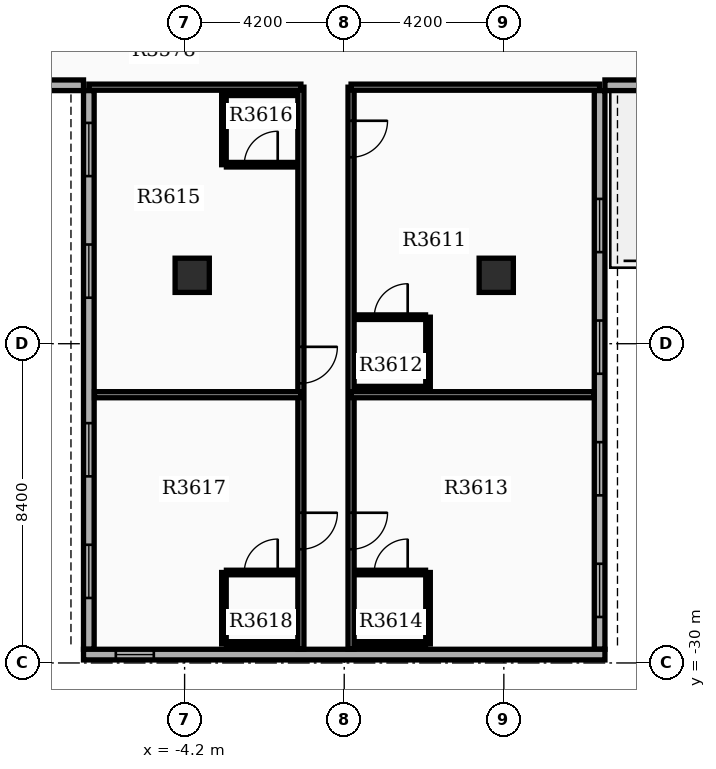
"""IFC4 building model, lengths in metres.
Left out: names, types, materials, properties, quantities, classifications, styles, units other than length and angle.
Written with IfcOpenShell. Run it as: python <this file> out.ifc"""

import sys

from ifc_helpers import new_model, si_unit, direction, frame, frame_2d, origin, origin_2d, place, context, subcontext, project, spatial, rectangle, extrude, element, fill, save


model = new_model("IFC4")
c1 = context("Model", 3, precision=1e-05, world=origin(), true_north=direction((0.0, 1.0)))
c2 = subcontext(c1, "Body", "Model", "MODEL_VIEW")
j1 = project(units=[si_unit("LENGTHUNIT", "METRE"), si_unit("PLANEANGLEUNIT", "RADIAN")], contexts=[c1])
p1 = place(None, origin())
s1 = spatial("IfcSite", under=j1, at=p1, CompositionType="ELEMENT")
p2 = place(p1, origin())
s2 = spatial("IfcBuilding", under=s1, at=p2, CompositionType="ELEMENT")
p3 = place(p2, frame((0.0, 0.0, 224.7)))
s3 = spatial("IfcBuildingStorey", under=s2, at=p3, CompositionType="ELEMENT", Elevation=224.7)
for number, where, z_axis, x_axis in (
    (1, (-4.0, -19.8, 0.0), (0.0, 0.0, 1.0), (1.0, 0.0, 0.0)),
    (2, (4.0, -19.8, 0.0), (0.0, 0.0, 1.0), (1.0, 0.0, 0.0)),
):
    element("IfcColumn", number, at=place(p3, frame(where, z_axis=z_axis, x_axis=x_axis)), inside=s3, PredefinedType="COLUMN", context=c2, shape_type="SweptSolid", body=[
        extrude(rectangle(XDim=0.9, YDim=0.9, at=origin_2d()), origin(), (0.0, 0.0, 1.0), 3.9),
    ])
p4 = place(p3, frame((-6.72, -14.94, 0.0), z_axis=(0.0, 0.0, 1.0), x_axis=(0.0, -1.0, 0.0)))
e3 = element("IfcWall", 3, at=p4, inside=s3, PredefinedType="STANDARD", context=c2, shape_type="SweptSolid", body=[
    extrude(rectangle(XDim=14.7, YDim=0.28, at=frame_2d((7.35, 0.0))), origin(), (0.0, 0.0, 1.0), 3.18),
])
p5 = place(p4, frame((0.85, 0.0, 0.8)))
e4 = element("IfcOpeningElement", 4, at=p5, cuts=e3, PredefinedType="OPENING", context=c2, shape_type="SweptSolid", body=[
    extrude(rectangle(XDim=1.4, YDim=1.6, at=frame_2d((0.7, 0.8))), frame((0.0, 0.15, 0.0), z_axis=(0.0, -1.0, 0.0), x_axis=(1.0, 0.0, 0.0)), (0.0, 0.0, 1.0), 0.3),
])
p6 = place(p4, frame((4.05, 0.0, 0.8)))
e5 = element("IfcOpeningElement", 5, at=p6, cuts=e3, PredefinedType="OPENING", context=c2, shape_type="SweptSolid", body=[
    extrude(rectangle(XDim=1.4, YDim=1.6, at=frame_2d((0.7, 0.8))), frame((0.0, 0.15, 0.0), z_axis=(0.0, -1.0, 0.0), x_axis=(1.0, 0.0, 0.0)), (0.0, 0.0, 1.0), 0.3),
])
p7 = place(p4, frame((8.75, 0.0, 0.8)))
e6 = element("IfcOpeningElement", 6, at=p7, cuts=e3, PredefinedType="OPENING", context=c2, shape_type="SweptSolid", body=[
    extrude(rectangle(XDim=1.4, YDim=1.6, at=frame_2d((0.7, 0.8))), frame((0.0, 0.15, 0.0), z_axis=(0.0, -1.0, 0.0), x_axis=(1.0, 0.0, 0.0)), (0.0, 0.0, 1.0), 0.3),
])
p8 = place(p4, frame((11.95, 0.0, 0.8)))
e7 = element("IfcOpeningElement", 7, at=p8, cuts=e3, PredefinedType="OPENING", context=c2, shape_type="SweptSolid", body=[
    extrude(rectangle(XDim=1.4, YDim=1.6, at=frame_2d((0.7, 0.8))), frame((0.0, 0.15, 0.0), z_axis=(0.0, -1.0, 0.0), x_axis=(1.0, 0.0, 0.0)), (0.0, 0.0, 1.0), 0.3),
])
p9 = place(p3, frame((6.72, -29.64, 0.0), z_axis=(0.0, 0.0, 1.0), x_axis=(0.0, 1.0, 0.0)))
e8 = element("IfcWall", 8, at=p9, inside=s3, PredefinedType="STANDARD", context=c2, shape_type="SweptSolid", body=[
    extrude(rectangle(XDim=14.7, YDim=0.28, at=frame_2d((7.35, 0.0))), origin(), (0.0, 0.0, 1.0), 3.18),
])
p10 = place(p9, frame((0.85, 0.0, 0.8)))
e9 = element("IfcOpeningElement", 9, at=p10, cuts=e8, PredefinedType="OPENING", context=c2, shape_type="SweptSolid", body=[
    extrude(rectangle(XDim=1.4, YDim=1.6, at=frame_2d((0.7, 0.8))), frame((0.0, 0.15, 0.0), z_axis=(0.0, -1.0, 0.0), x_axis=(1.0, 0.0, 0.0)), (0.0, 0.0, 1.0), 0.3),
])
p11 = place(p9, frame((4.05, 0.0, 0.8)))
e10 = element("IfcOpeningElement", 10, at=p11, cuts=e8, PredefinedType="OPENING", context=c2, shape_type="SweptSolid", body=[
    extrude(rectangle(XDim=1.4, YDim=1.6, at=frame_2d((0.7, 0.8))), frame((0.0, 0.15, 0.0), z_axis=(0.0, -1.0, 0.0), x_axis=(1.0, 0.0, 0.0)), (0.0, 0.0, 1.0), 0.3),
])
p12 = place(p9, frame((7.25, 0.0, 0.8)))
e11 = element("IfcOpeningElement", 11, at=p12, cuts=e8, PredefinedType="OPENING", context=c2, shape_type="SweptSolid", body=[
    extrude(rectangle(XDim=1.4, YDim=1.6, at=frame_2d((0.7, 0.8))), frame((0.0, 0.15, 0.0), z_axis=(0.0, -1.0, 0.0), x_axis=(1.0, 0.0, 0.0)), (0.0, 0.0, 1.0), 0.3),
])
p13 = place(p9, frame((10.45, 0.0, 0.8)))
e12 = element("IfcOpeningElement", 12, at=p13, cuts=e8, PredefinedType="OPENING", context=c2, shape_type="SweptSolid", body=[
    extrude(rectangle(XDim=1.4, YDim=1.6, at=frame_2d((0.7, 0.8))), frame((0.0, 0.15, 0.0), z_axis=(0.0, -1.0, 0.0), x_axis=(1.0, 0.0, 0.0)), (0.0, 0.0, 1.0), 0.3),
])
p14 = place(p3, frame((-6.86, -29.78, 0.0), z_axis=(0.0, 0.0, 1.0), x_axis=(1.0, 0.0, 0.0)))
e13 = element("IfcWall", 13, at=p14, inside=s3, PredefinedType="STANDARD", context=c2, shape_type="SweptSolid", body=[
    extrude(rectangle(XDim=13.72, YDim=0.28, at=frame_2d((6.86, 0.0))), origin(), (0.0, 0.0, 1.0), 3.18),
])
p15 = place(p14, frame((0.85, 0.0, 0.85)))
e14 = element("IfcOpeningElement", 14, at=p15, cuts=e13, PredefinedType="OPENING", context=c2, shape_type="SweptSolid", body=[
    extrude(rectangle(XDim=1.0, YDim=1.5, at=frame_2d((0.5, 0.75))), frame((0.0, 0.15, 0.0), z_axis=(0.0, -1.0, 0.0), x_axis=(1.0, 0.0, 0.0)), (0.0, 0.0, 1.0), 0.3),
])
for number, where, z_axis, x_axis in (
    (15, (-13.16, -14.8, 0.0), (0.0, 0.0, 1.0), (1.0, 0.0, 0.0)),
    (16, (13.16, -14.8, 0.0), (0.0, 0.0, 1.0), (-1.0, 0.0, 0.0)),
):
    element("IfcWall", number, at=place(p3, frame(where, z_axis=z_axis, x_axis=x_axis)), inside=s3, PredefinedType="STANDARD", context=c2, shape_type="SweptSolid", body=[
        extrude(rectangle(XDim=6.3, YDim=0.28, at=frame_2d((3.15, 0.0))), origin(), (0.0, 0.0, 1.0), 3.18),
    ])
p16 = place(p3, frame((0.18, -14.85, 0.0), z_axis=(0.0, 0.0, 1.0), x_axis=(0.0, -1.0, 0.0)))
e17 = element("IfcWall", 17, at=p16, inside=s3, PredefinedType="PARTITIONING", context=c2, shape_type="SweptSolid", body=[
    extrude(rectangle(XDim=14.782, YDim=0.16, at=frame_2d((7.391, 0.0))), origin(), (0.0, 0.0, 1.0), 3.17),
])
p17 = place(p16, frame((0.884, 0.0, 0.0)))
e18 = element("IfcOpeningElement", 18, at=p17, cuts=e17, PredefinedType="OPENING", context=c2, shape_type="SweptSolid", body=[
    extrude(rectangle(XDim=0.96, YDim=2.15, at=frame_2d((0.48, 1.075))), frame((0.0, 0.09, 0.0), z_axis=(0.0, -1.0, 0.0), x_axis=(1.0, 0.0, 0.0)), (0.0, 0.0, 1.0), 0.18),
])
p18 = place(p16, frame((11.198, 0.0, 0.0)))
e19 = element("IfcOpeningElement", 19, at=p18, cuts=e17, PredefinedType="OPENING", context=c2, shape_type="SweptSolid", body=[
    extrude(rectangle(XDim=0.96, YDim=2.15, at=frame_2d((0.48, 1.075))), frame((0.0, 0.09, 0.0), z_axis=(0.0, -1.0, 0.0), x_axis=(1.0, 0.0, 0.0)), (0.0, 0.0, 1.0), 0.18),
])
p19 = place(p3, frame((0.18, -14.85, 0.0), z_axis=(0.0, 0.0, 1.0), x_axis=(1.0, 0.0, 0.0)))
e20 = element("IfcWall", 20, at=p19, inside=s3, PredefinedType="PARTITIONING", context=c2, shape_type="SweptSolid", body=[
    extrude(rectangle(XDim=6.54, YDim=0.16, at=frame_2d((3.27, 0.0))), origin(), (0.0, 0.0, 1.0), 3.17),
])
p20 = place(p3, frame((0.18, -22.942, 0.0), z_axis=(0.0, 0.0, 1.0), x_axis=(1.0, 0.0, 0.0)))
e21 = element("IfcWall", 21, at=p20, inside=s3, PredefinedType="PARTITIONING", context=c2, shape_type="SweptSolid", body=[
    extrude(rectangle(XDim=6.392, YDim=0.16, at=frame_2d((3.196, 0.0))), origin(), (0.0, 0.0, 1.0), 3.17),
])
p21 = place(p3, frame((0.32, -20.902, 0.0), z_axis=(0.0, 0.0, 1.0), x_axis=(1.0, 0.0, 0.0)))
e22 = element("IfcWall", 22, at=p21, inside=s3, PredefinedType="PARTITIONING", context=c2, shape_type="SweptSolid", body=[
    extrude(rectangle(XDim=1.82, YDim=0.12, at=frame_2d((0.91, 0.0))), origin(), (0.0, 0.0, 1.0), 3.17),
])
p22 = place(p21, frame((0.47, 0.0, 0.0)))
e23 = element("IfcOpeningElement", 23, at=p22, cuts=e22, PredefinedType="OPENING", context=c2, shape_type="SweptSolid", body=[
    extrude(rectangle(XDim=0.88, YDim=2.1, at=frame_2d((0.44, 1.05))), frame((0.0, 0.07, 0.0), z_axis=(0.0, -1.0, 0.0), x_axis=(1.0, 0.0, 0.0)), (0.0, 0.0, 1.0), 0.14),
])
p23 = place(p3, frame((0.32, -22.782, 0.0), z_axis=(0.0, 0.0, 1.0), x_axis=(1.0, 0.0, 0.0)))
e24 = element("IfcWall", 24, at=p23, inside=s3, PredefinedType="PARTITIONING", context=c2, shape_type="SweptSolid", body=[
    extrude(rectangle(XDim=1.82, YDim=0.12, at=frame_2d((0.91, 0.0))), origin(), (0.0, 0.0, 1.0), 3.17),
])
p24 = place(p3, frame((2.205, -20.902, 0.0), z_axis=(0.0, 0.0, 1.0), x_axis=(0.0, -1.0, 0.0)))
e25 = element("IfcWall", 25, at=p24, inside=s3, PredefinedType="PARTITIONING", context=c2, shape_type="SweptSolid", body=[
    extrude(rectangle(XDim=1.88, YDim=0.12, at=frame_2d((0.94, 0.0))), origin(), (0.0, 0.0, 1.0), 3.17),
])
p25 = place(p3, frame((0.32, -27.62, 0.0), z_axis=(0.0, 0.0, 1.0), x_axis=(1.0, 0.0, 0.0)))
e26 = element("IfcWall", 26, at=p25, inside=s3, PredefinedType="PARTITIONING", context=c2, shape_type="SweptSolid", body=[
    extrude(rectangle(XDim=1.82, YDim=0.12, at=frame_2d((0.91, 0.0))), origin(), (0.0, 0.0, 1.0), 3.17),
])
p26 = place(p25, frame((0.47, 0.0, 0.0)))
e27 = element("IfcOpeningElement", 27, at=p26, cuts=e26, PredefinedType="OPENING", context=c2, shape_type="SweptSolid", body=[
    extrude(rectangle(XDim=0.88, YDim=2.1, at=frame_2d((0.44, 1.05))), frame((0.0, 0.07, 0.0), z_axis=(0.0, -1.0, 0.0), x_axis=(1.0, 0.0, 0.0)), (0.0, 0.0, 1.0), 0.14),
])
p27 = place(p3, frame((0.32, -29.5, 0.0), z_axis=(0.0, 0.0, 1.0), x_axis=(1.0, 0.0, 0.0)))
e28 = element("IfcWall", 28, at=p27, inside=s3, PredefinedType="PARTITIONING", context=c2, shape_type="SweptSolid", body=[
    extrude(rectangle(XDim=1.82, YDim=0.12, at=frame_2d((0.91, 0.0))), origin(), (0.0, 0.0, 1.0), 3.17),
])
p28 = place(p3, frame((2.205, -27.62, 0.0), z_axis=(0.0, 0.0, 1.0), x_axis=(0.0, -1.0, 0.0)))
e29 = element("IfcWall", 29, at=p28, inside=s3, PredefinedType="PARTITIONING", context=c2, shape_type="SweptSolid", body=[
    extrude(rectangle(XDim=1.88, YDim=0.12, at=frame_2d((0.94, 0.0))), origin(), (0.0, 0.0, 1.0), 3.17),
])
p29 = place(p3, frame((-1.14, -14.85, 0.0), z_axis=(0.0, 0.0, 1.0), x_axis=(0.0, -1.0, 0.0)))
e30 = element("IfcWall", 30, at=p29, inside=s3, PredefinedType="PARTITIONING", context=c2, shape_type="SweptSolid", body=[
    extrude(rectangle(XDim=14.782, YDim=0.16, at=frame_2d((7.391, 0.0))), origin(), (0.0, 0.0, 1.0), 3.17),
])
p30 = place(p29, frame((6.832, 0.0, 0.0)))
e31 = element("IfcOpeningElement", 31, at=p30, cuts=e30, PredefinedType="OPENING", context=c2, shape_type="SweptSolid", body=[
    extrude(rectangle(XDim=0.96, YDim=2.15, at=frame_2d((0.48, 1.075))), frame((0.0, 0.09, 0.0), z_axis=(0.0, -1.0, 0.0), x_axis=(1.0, 0.0, 0.0)), (0.0, 0.0, 1.0), 0.18),
])
p31 = place(p29, frame((11.198, 0.0, 0.0)))
e32 = element("IfcOpeningElement", 32, at=p31, cuts=e30, PredefinedType="OPENING", context=c2, shape_type="SweptSolid", body=[
    extrude(rectangle(XDim=0.96, YDim=2.15, at=frame_2d((0.48, 1.075))), frame((0.0, 0.09, 0.0), z_axis=(0.0, -1.0, 0.0), x_axis=(1.0, 0.0, 0.0)), (0.0, 0.0, 1.0), 0.18),
])
p32 = place(p3, frame((-1.14, -14.85, 0.0), z_axis=(0.0, 0.0, 1.0), x_axis=(-1.0, 0.0, 0.0)))
e33 = element("IfcWall", 33, at=p32, inside=s3, PredefinedType="PARTITIONING", context=c2, shape_type="SweptSolid", body=[
    extrude(rectangle(XDim=5.58, YDim=0.16, at=frame_2d((2.79, 0.0))), origin(), (0.0, 0.0, 1.0), 3.17),
])
p33 = place(p3, frame((-1.14, -22.942, 0.0), z_axis=(0.0, 0.0, 1.0), x_axis=(-1.0, 0.0, 0.0)))
e34 = element("IfcWall", 34, at=p33, inside=s3, PredefinedType="PARTITIONING", context=c2, shape_type="SweptSolid", body=[
    extrude(rectangle(XDim=5.432, YDim=0.16, at=frame_2d((2.716, 0.0))), origin(), (0.0, 0.0, 1.0), 3.17),
])
p34 = place(p3, frame((-3.1, -16.89, 0.0), z_axis=(0.0, 0.0, 1.0), x_axis=(1.0, 0.0, 0.0)))
e35 = element("IfcWall", 35, at=p34, inside=s3, PredefinedType="PARTITIONING", context=c2, shape_type="SweptSolid", body=[
    extrude(rectangle(XDim=1.82, YDim=0.12, at=frame_2d((0.91, 0.0))), origin(), (0.0, 0.0, 1.0), 3.17),
])
p35 = place(p34, frame((0.47, 0.0, 0.0)))
e36 = element("IfcOpeningElement", 36, at=p35, cuts=e35, PredefinedType="OPENING", context=c2, shape_type="SweptSolid", body=[
    extrude(rectangle(XDim=0.88, YDim=2.1, at=frame_2d((0.44, 1.05))), frame((0.0, 0.07, 0.0), z_axis=(0.0, -1.0, 0.0), x_axis=(1.0, 0.0, 0.0)), (0.0, 0.0, 1.0), 0.14),
])
p36 = place(p3, frame((-3.1, -15.01, 0.0), z_axis=(0.0, 0.0, 1.0), x_axis=(1.0, 0.0, 0.0)))
e37 = element("IfcWall", 37, at=p36, inside=s3, PredefinedType="PARTITIONING", context=c2, shape_type="SweptSolid", body=[
    extrude(rectangle(XDim=1.82, YDim=0.12, at=frame_2d((0.91, 0.0))), origin(), (0.0, 0.0, 1.0), 3.17),
])
p37 = place(p3, frame((-3.165, -15.01, 0.0), z_axis=(0.0, 0.0, 1.0), x_axis=(0.0, -1.0, 0.0)))
e38 = element("IfcWall", 38, at=p37, inside=s3, PredefinedType="PARTITIONING", context=c2, shape_type="SweptSolid", body=[
    extrude(rectangle(XDim=1.88, YDim=0.12, at=frame_2d((0.94, 0.0))), origin(), (0.0, 0.0, 1.0), 3.17),
])
p38 = place(p3, frame((-3.1, -27.62, 0.0), z_axis=(0.0, 0.0, 1.0), x_axis=(1.0, 0.0, 0.0)))
e39 = element("IfcWall", 39, at=p38, inside=s3, PredefinedType="PARTITIONING", context=c2, shape_type="SweptSolid", body=[
    extrude(rectangle(XDim=1.82, YDim=0.12, at=frame_2d((0.91, 0.0))), origin(), (0.0, 0.0, 1.0), 3.17),
])
p39 = place(p38, frame((0.47, 0.0, 0.0)))
e40 = element("IfcOpeningElement", 40, at=p39, cuts=e39, PredefinedType="OPENING", context=c2, shape_type="SweptSolid", body=[
    extrude(rectangle(XDim=0.88, YDim=2.1, at=frame_2d((0.44, 1.05))), frame((0.0, 0.07, 0.0), z_axis=(0.0, -1.0, 0.0), x_axis=(1.0, 0.0, 0.0)), (0.0, 0.0, 1.0), 0.14),
])
p40 = place(p3, frame((-3.1, -29.5, 0.0), z_axis=(0.0, 0.0, 1.0), x_axis=(1.0, 0.0, 0.0)))
e41 = element("IfcWall", 41, at=p40, inside=s3, PredefinedType="PARTITIONING", context=c2, shape_type="SweptSolid", body=[
    extrude(rectangle(XDim=1.82, YDim=0.12, at=frame_2d((0.91, 0.0))), origin(), (0.0, 0.0, 1.0), 3.17),
])
p41 = place(p3, frame((-3.165, -27.62, 0.0), z_axis=(0.0, 0.0, 1.0), x_axis=(0.0, -1.0, 0.0)))
e42 = element("IfcWall", 42, at=p41, inside=s3, PredefinedType="PARTITIONING", context=c2, shape_type="SweptSolid", body=[
    extrude(rectangle(XDim=1.88, YDim=0.12, at=frame_2d((0.94, 0.0))), origin(), (0.0, 0.0, 1.0), 3.17),
])
p42 = place(p5, origin())
e43 = element("IfcWindow", 43, at=p42, inside=s3, PartitioningType="SINGLE_PANEL", PredefinedType="WINDOW", context=c2, shape_type="SweptSolid", body=[
    extrude(rectangle(XDim=1.4, YDim=1.6, at=frame_2d((0.7, 0.8))), frame((0.0, 0.03, 0.0), z_axis=(0.0, -1.0, 0.0), x_axis=(1.0, 0.0, 0.0)), (0.0, 0.0, 1.0), 0.06),
])
fill(e4, e43)
p43 = place(p6, origin())
e44 = element("IfcWindow", 44, at=p43, inside=s3, PartitioningType="SINGLE_PANEL", PredefinedType="WINDOW", context=c2, shape_type="SweptSolid", body=[
    extrude(rectangle(XDim=1.4, YDim=1.6, at=frame_2d((0.7, 0.8))), frame((0.0, 0.03, 0.0), z_axis=(0.0, -1.0, 0.0), x_axis=(1.0, 0.0, 0.0)), (0.0, 0.0, 1.0), 0.06),
])
fill(e5, e44)
p44 = place(p7, origin())
e45 = element("IfcWindow", 45, at=p44, inside=s3, PartitioningType="SINGLE_PANEL", PredefinedType="WINDOW", context=c2, shape_type="SweptSolid", body=[
    extrude(rectangle(XDim=1.4, YDim=1.6, at=frame_2d((0.7, 0.8))), frame((0.0, 0.03, 0.0), z_axis=(0.0, -1.0, 0.0), x_axis=(1.0, 0.0, 0.0)), (0.0, 0.0, 1.0), 0.06),
])
fill(e6, e45)
p45 = place(p8, origin())
e46 = element("IfcWindow", 46, at=p45, inside=s3, PartitioningType="SINGLE_PANEL", PredefinedType="WINDOW", context=c2, shape_type="SweptSolid", body=[
    extrude(rectangle(XDim=1.4, YDim=1.6, at=frame_2d((0.7, 0.8))), frame((0.0, 0.03, 0.0), z_axis=(0.0, -1.0, 0.0), x_axis=(1.0, 0.0, 0.0)), (0.0, 0.0, 1.0), 0.06),
])
fill(e7, e46)
p46 = place(p10, origin())
e47 = element("IfcWindow", 47, at=p46, inside=s3, PartitioningType="SINGLE_PANEL", PredefinedType="WINDOW", context=c2, shape_type="SweptSolid", body=[
    extrude(rectangle(XDim=1.4, YDim=1.6, at=frame_2d((0.7, 0.8))), frame((0.0, 0.03, 0.0), z_axis=(0.0, -1.0, 0.0), x_axis=(1.0, 0.0, 0.0)), (0.0, 0.0, 1.0), 0.06),
])
fill(e9, e47)
p47 = place(p11, origin())
e48 = element("IfcWindow", 48, at=p47, inside=s3, PartitioningType="SINGLE_PANEL", PredefinedType="WINDOW", context=c2, shape_type="SweptSolid", body=[
    extrude(rectangle(XDim=1.4, YDim=1.6, at=frame_2d((0.7, 0.8))), frame((0.0, 0.03, 0.0), z_axis=(0.0, -1.0, 0.0), x_axis=(1.0, 0.0, 0.0)), (0.0, 0.0, 1.0), 0.06),
])
fill(e10, e48)
p48 = place(p12, origin())
e49 = element("IfcWindow", 49, at=p48, inside=s3, PartitioningType="SINGLE_PANEL", PredefinedType="WINDOW", context=c2, shape_type="SweptSolid", body=[
    extrude(rectangle(XDim=1.4, YDim=1.6, at=frame_2d((0.7, 0.8))), frame((0.0, 0.03, 0.0), z_axis=(0.0, -1.0, 0.0), x_axis=(1.0, 0.0, 0.0)), (0.0, 0.0, 1.0), 0.06),
])
fill(e11, e49)
p49 = place(p13, origin())
e50 = element("IfcWindow", 50, at=p49, inside=s3, PartitioningType="SINGLE_PANEL", PredefinedType="WINDOW", context=c2, shape_type="SweptSolid", body=[
    extrude(rectangle(XDim=1.4, YDim=1.6, at=frame_2d((0.7, 0.8))), frame((0.0, 0.03, 0.0), z_axis=(0.0, -1.0, 0.0), x_axis=(1.0, 0.0, 0.0)), (0.0, 0.0, 1.0), 0.06),
])
fill(e12, e50)
p50 = place(p15, origin())
e51 = element("IfcWindow", 51, at=p50, inside=s3, PartitioningType="SINGLE_PANEL", PredefinedType="WINDOW", context=c2, shape_type="SweptSolid", body=[
    extrude(rectangle(XDim=1.0, YDim=1.5, at=frame_2d((0.5, 0.75))), frame((0.0, 0.03, 0.0), z_axis=(0.0, -1.0, 0.0), x_axis=(1.0, 0.0, 0.0)), (0.0, 0.0, 1.0), 0.06),
])
fill(e14, e51)
p51 = place(p17, origin())
e52 = element("IfcDoor", 52, at=p51, inside=s3, OperationType="SINGLE_SWING_LEFT", PredefinedType="DOOR", context=c2, shape_type="SweptSolid", body=[
    extrude(rectangle(XDim=0.96, YDim=2.15, at=frame_2d((0.48, 1.075))), frame((0.0, 0.025, 0.0), z_axis=(0.0, -1.0, 0.0), x_axis=(1.0, 0.0, 0.0)), (0.0, 0.0, 1.0), 0.05),
])
fill(e18, e52)
p52 = place(p22, origin())
e53 = element("IfcDoor", 53, at=p52, inside=s3, OperationType="SINGLE_SWING_RIGHT", PredefinedType="DOOR", context=c2, shape_type="SweptSolid", body=[
    extrude(rectangle(XDim=0.88, YDim=2.1, at=frame_2d((0.44, 1.05))), frame((0.0, 0.025, 0.0), z_axis=(0.0, -1.0, 0.0), x_axis=(1.0, 0.0, 0.0)), (0.0, 0.0, 1.0), 0.05),
])
fill(e23, e53)
p53 = place(p18, origin())
e54 = element("IfcDoor", 54, at=p53, inside=s3, OperationType="SINGLE_SWING_LEFT", PredefinedType="DOOR", context=c2, shape_type="SweptSolid", body=[
    extrude(rectangle(XDim=0.96, YDim=2.15, at=frame_2d((0.48, 1.075))), frame((0.0, 0.025, 0.0), z_axis=(0.0, -1.0, 0.0), x_axis=(1.0, 0.0, 0.0)), (0.0, 0.0, 1.0), 0.05),
])
fill(e19, e54)
p54 = place(p26, origin())
e55 = element("IfcDoor", 55, at=p54, inside=s3, OperationType="SINGLE_SWING_RIGHT", PredefinedType="DOOR", context=c2, shape_type="SweptSolid", body=[
    extrude(rectangle(XDim=0.88, YDim=2.1, at=frame_2d((0.44, 1.05))), frame((0.0, 0.025, 0.0), z_axis=(0.0, -1.0, 0.0), x_axis=(1.0, 0.0, 0.0)), (0.0, 0.0, 1.0), 0.05),
])
fill(e27, e55)
p55 = place(p30, origin())
e56 = element("IfcDoor", 56, at=p55, inside=s3, OperationType="SINGLE_SWING_LEFT", PredefinedType="DOOR", context=c2, shape_type="SweptSolid", body=[
    extrude(rectangle(XDim=0.96, YDim=2.15, at=frame_2d((0.48, 1.075))), frame((0.0, 0.025, 0.0), z_axis=(0.0, -1.0, 0.0), x_axis=(1.0, 0.0, 0.0)), (0.0, 0.0, 1.0), 0.05),
])
fill(e31, e56)
p56 = place(p35, origin())
e57 = element("IfcDoor", 57, at=p56, inside=s3, OperationType="SINGLE_SWING_RIGHT", PredefinedType="DOOR", context=c2, shape_type="SweptSolid", body=[
    extrude(rectangle(XDim=0.88, YDim=2.1, at=frame_2d((0.44, 1.05))), frame((0.0, 0.025, 0.0), z_axis=(0.0, -1.0, 0.0), x_axis=(1.0, 0.0, 0.0)), (0.0, 0.0, 1.0), 0.05),
])
fill(e36, e57)
p57 = place(p31, origin())
e58 = element("IfcDoor", 58, at=p57, inside=s3, OperationType="SINGLE_SWING_LEFT", PredefinedType="DOOR", context=c2, shape_type="SweptSolid", body=[
    extrude(rectangle(XDim=0.96, YDim=2.15, at=frame_2d((0.48, 1.075))), frame((0.0, 0.025, 0.0), z_axis=(0.0, -1.0, 0.0), x_axis=(1.0, 0.0, 0.0)), (0.0, 0.0, 1.0), 0.05),
])
fill(e32, e58)
p58 = place(p39, origin())
e59 = element("IfcDoor", 59, at=p58, inside=s3, OperationType="SINGLE_SWING_RIGHT", PredefinedType="DOOR", context=c2, shape_type="SweptSolid", body=[
    extrude(rectangle(XDim=0.88, YDim=2.1, at=frame_2d((0.44, 1.05))), frame((0.0, 0.025, 0.0), z_axis=(0.0, -1.0, 0.0), x_axis=(1.0, 0.0, 0.0)), (0.0, 0.0, 1.0), 0.05),
])
fill(e40, e59)
save(model, sys.argv[1])
